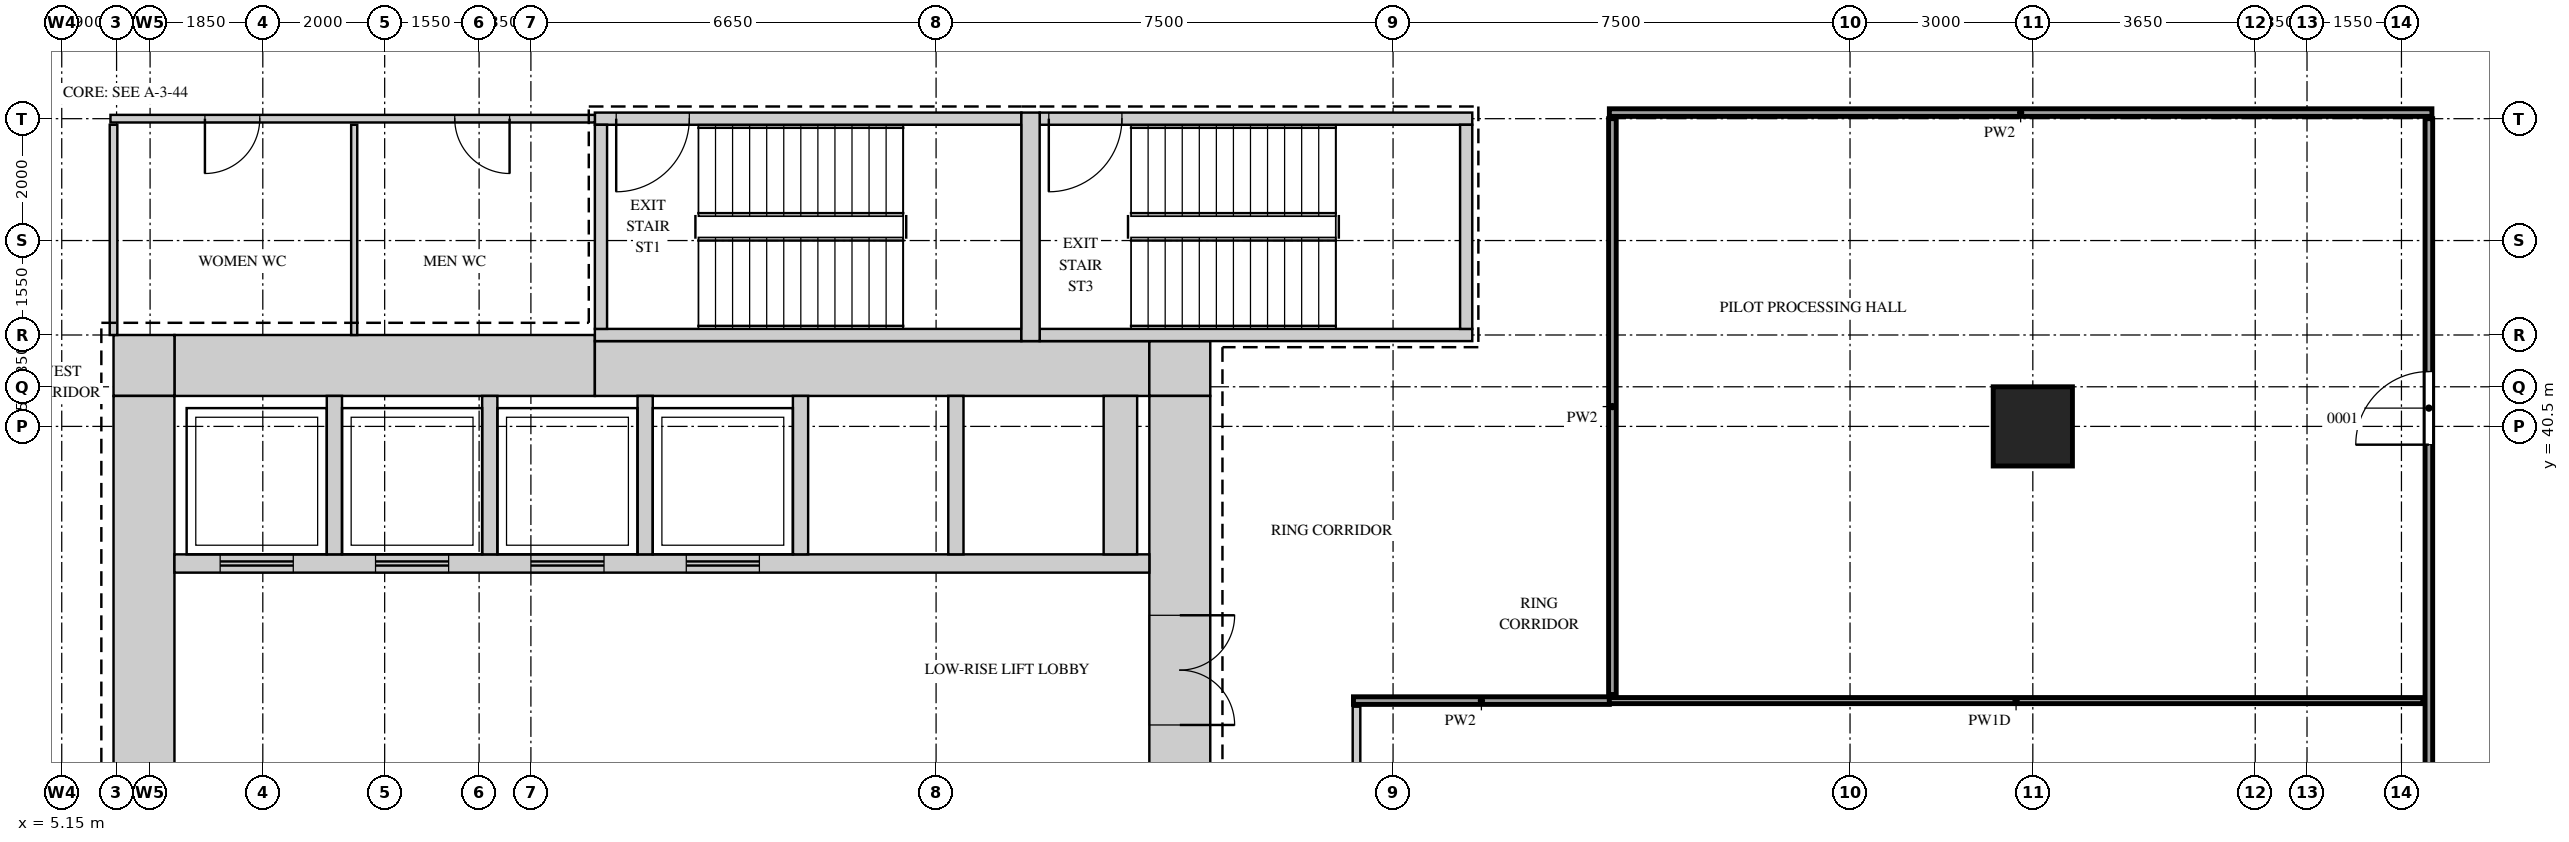
"""IFC4 building model, lengths in metres.
Left out: names, types, materials, properties, quantities, classifications, styles, units other than length and angle.
Written with IfcOpenShell. Run it as: python <this file> out.ifc"""

import sys

from ifc_helpers import new_model, si_unit, direction, frame, frame_2d, origin, origin_2d, place, context, subcontext, project, spatial, rectangle, extrude, source, transform, mapped, element, fill, save


model = new_model("IFC4")
c1 = context("Model", 3, precision=1e-05, world=origin(), true_north=direction((0.0, 1.0)))
c2 = subcontext(c1, "Body", "Model", "MODEL_VIEW")
j1 = project(units=[si_unit("LENGTHUNIT", "METRE"), si_unit("PLANEANGLEUNIT", "RADIAN")], contexts=[c1])
p1 = place(None, origin())
s1 = spatial("IfcSite", under=j1, at=p1, CompositionType="ELEMENT")
p2 = place(p1, origin())
s2 = spatial("IfcBuilding", under=s1, at=p2, CompositionType="ELEMENT")
p3 = place(p2, frame((0.0, 0.0, 123.5)))
s3 = spatial("IfcBuildingStorey", under=s2, at=p3, CompositionType="ELEMENT", Elevation=123.5)
m1 = source(origin(), c2, "Body", "SweptSolid", [
    extrude(rectangle(XDim=6.9, YDim=1.0, at=frame_2d((3.45, 0.0))), origin(), (0.0, 0.0, 1.0), 4.1),
])
p4 = place(p3, frame((7.0, 41.5, 0.0), z_axis=(0.0, 0.0, 1.0), x_axis=(1.0, 0.0, 0.0)))
e1 = element("IfcWall", 1, at=p4, inside=s3, PredefinedType="SHEAR", context=c2, shape_type="MappedRepresentation", body=[
    mapped(m1, transform((0.0, 0.0, 0.0))),
])
m2 = source(origin(), c2, "Body", "SweptSolid", [
    extrude(rectangle(XDim=9.1, YDim=0.9, at=frame_2d((4.55, 0.0))), origin(), (0.0, 0.0, 1.0), 4.1),
])
p5 = place(p3, frame((13.9, 41.45, 0.0), z_axis=(0.0, 0.0, 1.0), x_axis=(1.0, 0.0, 0.0)))
e2 = element("IfcWall", 2, at=p5, inside=s3, PredefinedType="SHEAR", context=c2, shape_type="MappedRepresentation", body=[
    mapped(m2, transform((0.0, 0.0, 0.0))),
])
m3 = source(origin(), c2, "Body", "SweptSolid", [
    extrude(rectangle(XDim=1.0, YDim=0.9, at=frame_2d((0.5, 0.0))), origin(), (0.0, 0.0, 1.0), 4.1),
])
p6 = place(p3, frame((23.0, 41.45, 0.0), z_axis=(0.0, 0.0, 1.0), x_axis=(1.0, 0.0, 0.0)))
e3 = element("IfcWall", 3, at=p6, inside=s3, PredefinedType="SHEAR", context=c2, shape_type="MappedRepresentation", body=[
    mapped(m3, transform((0.0, 0.0, 0.0))),
])
m4 = source(origin(), c2, "Body", "SweptSolid", [
    extrude(rectangle(XDim=1.0, YDim=1.0, at=frame_2d((0.5, 0.0))), origin(), (0.0, 0.0, 1.0), 4.1),
])
p7 = place(p3, frame((6.0, 41.5, 0.0), z_axis=(0.0, 0.0, 1.0), x_axis=(1.0, 0.0, 0.0)))
e4 = element("IfcWall", 4, at=p7, inside=s3, PredefinedType="SHEAR", context=c2, shape_type="MappedRepresentation", body=[
    mapped(m4, transform((0.0, 0.0, 0.0))),
])
m5 = source(origin(), c2, "Body", "SweptSolid", [
    extrude(rectangle(XDim=28.0, YDim=1.0, at=frame_2d((14.0, 0.0))), origin(), (0.0, 0.0, 1.0), 4.1),
])
p8 = place(p3, frame((23.5, 13.0, 0.0), z_axis=(0.0, 0.0, 1.0), x_axis=(0.0, 1.0, 0.0)))
e5 = element("IfcWall", 5, at=p8, inside=s3, PredefinedType="SHEAR", context=c2, shape_type="MappedRepresentation", body=[
    mapped(m5, transform((0.0, 0.0, 0.0))),
])
m6 = source(origin(), c2, "Body", "SweptSolid", [
    extrude(rectangle(XDim=1.8, YDim=2.1, at=frame_2d((0.9, 1.05))), frame((0.0, 0.51, 0.0), z_axis=(0.0, -1.0, 0.0), x_axis=(1.0, 0.0, 0.0)), (0.0, 0.0, 1.0), 1.02),
])
p9 = place(p8, frame((22.6, 0.0, 0.0)))
e6 = element("IfcOpeningElement", 6, at=p9, cuts=e5, PredefinedType="OPENING", context=c2, shape_type="MappedRepresentation", body=[
    mapped(m6, transform((0.0, 0.0, 0.0))),
])
m7 = source(origin(), c2, "Body", "SweptSolid", [
    extrude(rectangle(XDim=1.2, YDim=2.1, at=frame_2d((0.6, 1.05))), frame((0.0, 0.51, 0.0), z_axis=(0.0, -1.0, 0.0), x_axis=(1.0, 0.0, 0.0)), (0.0, 0.0, 1.0), 1.02),
])
p10 = place(p8, frame((13.85, 0.0, 0.0)))
e7 = element("IfcOpeningElement", 7, at=p10, cuts=e5, PredefinedType="OPENING", context=c2, shape_type="MappedRepresentation", body=[
    mapped(m7, transform((0.0, 0.0, 0.0))),
])
m8 = source(origin(), c2, "Body", "SweptSolid", [
    extrude(rectangle(XDim=0.9, YDim=2.1, at=frame_2d((0.45, 1.05))), frame((0.0, 0.51, 0.0), z_axis=(0.0, -1.0, 0.0), x_axis=(1.0, 0.0, 0.0)), (0.0, 0.0, 1.0), 1.02),
])
p11 = place(p8, frame((2.15, 0.0, 0.0)))
e8 = element("IfcOpeningElement", 8, at=p11, cuts=e5, PredefinedType="OPENING", context=c2, shape_type="MappedRepresentation", body=[
    mapped(m8, transform((0.0, 0.0, 0.0))),
])
p12 = place(p8, frame((7.0, 0.0, 0.0)))
e9 = element("IfcOpeningElement", 9, at=p12, cuts=e5, PredefinedType="OPENING", context=c2, shape_type="MappedRepresentation", body=[
    mapped(m8, transform((0.0, 0.0, 0.0))),
])
p13 = place(p3, frame((6.5, 13.0, 0.0), z_axis=(0.0, 0.0, 1.0), x_axis=(0.0, 1.0, 0.0)))
e10 = element("IfcWall", 10, at=p13, inside=s3, PredefinedType="SHEAR", context=c2, shape_type="MappedRepresentation", body=[
    mapped(m5, transform((0.0, 0.0, 0.0))),
])
m9 = source(origin(), c2, "Body", "SweptSolid", [
    extrude(rectangle(XDim=7.0, YDim=0.2, at=frame_2d((3.5, 0.0))), origin(), (0.0, 0.0, 1.0), 4.1),
])
p14 = place(p3, frame((13.9, 45.55, 0.0), z_axis=(0.0, 0.0, 1.0), x_axis=(1.0, 0.0, 0.0)))
e11 = element("IfcWall", 11, at=p14, inside=s3, PredefinedType="SHEAR", context=c2, shape_type="MappedRepresentation", body=[
    mapped(m9, transform((0.0, 0.0, 0.0))),
])
m10 = source(origin(), c2, "Body", "SweptSolid", [
    extrude(rectangle(XDim=1.2, YDim=2.1, at=frame_2d((0.6, 1.05))), frame((0.0, 0.11, 0.0), z_axis=(0.0, -1.0, 0.0), x_axis=(1.0, 0.0, 0.0)), (0.0, 0.0, 1.0), 0.22),
])
p15 = place(p14, frame((0.35, 0.0, 0.0)))
e12 = element("IfcOpeningElement", 12, at=p15, cuts=e11, PredefinedType="OPENING", context=c2, shape_type="MappedRepresentation", body=[
    mapped(m10, transform((0.0, 0.0, 0.0))),
])
p16 = place(p3, frame((13.9, 42.0, 0.0), z_axis=(0.0, 0.0, 1.0), x_axis=(1.0, 0.0, 0.0)))
e13 = element("IfcWall", 13, at=p16, inside=s3, PredefinedType="SHEAR", context=c2, shape_type="MappedRepresentation", body=[
    mapped(m9, transform((0.0, 0.0, 0.0))),
])
m11 = source(origin(), c2, "Body", "SweptSolid", [
    extrude(rectangle(XDim=7.1, YDim=0.2, at=frame_2d((3.55, 0.0))), origin(), (0.0, 0.0, 1.0), 4.1),
])
p17 = place(p3, frame((21.2, 45.55, 0.0), z_axis=(0.0, 0.0, 1.0), x_axis=(1.0, 0.0, 0.0)))
e14 = element("IfcWall", 14, at=p17, inside=s3, PredefinedType="SHEAR", context=c2, shape_type="MappedRepresentation", body=[
    mapped(m11, transform((0.0, 0.0, 0.0))),
])
p18 = place(p17, frame((0.15, 0.0, 0.0)))
e15 = element("IfcOpeningElement", 15, at=p18, cuts=e14, PredefinedType="OPENING", context=c2, shape_type="MappedRepresentation", body=[
    mapped(m10, transform((0.0, 0.0, 0.0))),
])
p19 = place(p3, frame((21.2, 42.0, 0.0), z_axis=(0.0, 0.0, 1.0), x_axis=(1.0, 0.0, 0.0)))
e16 = element("IfcWall", 16, at=p19, inside=s3, PredefinedType="SHEAR", context=c2, shape_type="MappedRepresentation", body=[
    mapped(m11, transform((0.0, 0.0, 0.0))),
])
m12 = source(origin(), c2, "Body", "SweptSolid", [
    extrude(rectangle(XDim=3.75, YDim=0.3, at=frame_2d((1.875, 0.0))), origin(), (0.0, 0.0, 1.0), 4.1),
])
p20 = place(p3, frame((21.05, 41.9, 0.0), z_axis=(0.0, 0.0, 1.0), x_axis=(0.0, 1.0, 0.0)))
e17 = element("IfcWall", 17, at=p20, inside=s3, PredefinedType="SHEAR", context=c2, shape_type="MappedRepresentation", body=[
    mapped(m12, transform((0.0, 0.0, 0.0))),
])
m13 = source(origin(), c2, "Body", "SweptSolid", [
    extrude(rectangle(XDim=3.35, YDim=0.2, at=frame_2d((1.675, 0.0))), origin(), (0.0, 0.0, 1.0), 4.1),
])
for number, where, z_axis, x_axis in (
    (18, (14.0, 42.1, 0.0), (0.0, 0.0, 1.0), (0.0, 1.0, 0.0)),
    (19, (28.2, 42.1, 0.0), (0.0, 0.0, 1.0), (0.0, 1.0, 0.0)),
):
    element("IfcWall", number, at=place(p3, frame(where, z_axis=z_axis, x_axis=x_axis)), inside=s3, PredefinedType="SHEAR", context=c2, shape_type="MappedRepresentation", body=[
        mapped(m13, transform((0.0, 0.0, 0.0))),
    ])
m14 = source(origin(), c2, "Body", "SweptSolid", [
    extrude(rectangle(XDim=16.0, YDim=0.3, at=frame_2d((8.0, 0.0))), origin(), (0.0, 0.0, 1.0), 4.1),
])
p21 = place(p3, frame((7.0, 38.25, 0.0), z_axis=(0.0, 0.0, 1.0), x_axis=(1.0, 0.0, 0.0)))
e20 = element("IfcWall", 20, at=p21, inside=s3, PredefinedType="STANDARD", context=c2, shape_type="MappedRepresentation", body=[
    mapped(m14, transform((0.0, 0.0, 0.0))),
])
m15 = source(origin(), c2, "Body", "SweptSolid", [
    extrude(rectangle(XDim=1.2, YDim=2.1, at=frame_2d((0.6, 1.05))), frame((0.0, 0.16, 0.0), z_axis=(0.0, -1.0, 0.0), x_axis=(1.0, 0.0, 0.0)), (0.0, 0.0, 1.0), 0.32),
])
p22 = place(p21, frame((0.75, 0.0, 0.0)))
e21 = element("IfcOpeningElement", 21, at=p22, cuts=e20, PredefinedType="OPENING", context=c2, shape_type="MappedRepresentation", body=[
    mapped(m15, transform((0.0, 0.0, 0.0))),
])
p23 = place(p21, frame((3.3, 0.0, 0.0)))
e22 = element("IfcOpeningElement", 22, at=p23, cuts=e20, PredefinedType="OPENING", context=c2, shape_type="MappedRepresentation", body=[
    mapped(m15, transform((0.0, 0.0, 0.0))),
])
p24 = place(p21, frame((5.85, 0.0, 0.0)))
e23 = element("IfcOpeningElement", 23, at=p24, cuts=e20, PredefinedType="OPENING", context=c2, shape_type="MappedRepresentation", body=[
    mapped(m15, transform((0.0, 0.0, 0.0))),
])
p25 = place(p21, frame((8.4, 0.0, 0.0)))
e24 = element("IfcOpeningElement", 24, at=p25, cuts=e20, PredefinedType="OPENING", context=c2, shape_type="MappedRepresentation", body=[
    mapped(m15, transform((0.0, 0.0, 0.0))),
])
m16 = source(origin(), c2, "Body", "SweptSolid", [
    extrude(rectangle(XDim=2.6, YDim=0.25, at=frame_2d((1.3, 0.0))), origin(), (0.0, 0.0, 1.0), 4.1),
])
for number, where, z_axis, x_axis in (
    (25, (9.625, 38.4, 0.0), (0.0, 0.0, 1.0), (0.0, 1.0, 0.0)),
    (26, (12.175, 38.4, 0.0), (0.0, 0.0, 1.0), (0.0, 1.0, 0.0)),
    (27, (14.725, 38.4, 0.0), (0.0, 0.0, 1.0), (0.0, 1.0, 0.0)),
    (28, (17.275, 38.4, 0.0), (0.0, 0.0, 1.0), (0.0, 1.0, 0.0)),
    (29, (19.825, 38.4, 0.0), (0.0, 0.0, 1.0), (0.0, 1.0, 0.0)),
):
    element("IfcWall", number, at=place(p3, frame(where, z_axis=z_axis, x_axis=x_axis)), inside=s3, PredefinedType="STANDARD", context=c2, shape_type="MappedRepresentation", body=[
        mapped(m16, transform((0.0, 0.0, 0.0))),
    ])
m17 = source(origin(), c2, "Body", "SweptSolid", [
    extrude(rectangle(XDim=2.6, YDim=0.55, at=frame_2d((1.3, 0.0))), origin(), (0.0, 0.0, 1.0), 4.1),
])
p26 = place(p3, frame((22.525, 38.4, 0.0), z_axis=(0.0, 0.0, 1.0), x_axis=(0.0, 1.0, 0.0)))
e30 = element("IfcWall", 30, at=p26, inside=s3, PredefinedType="STANDARD", context=c2, shape_type="MappedRepresentation", body=[
    mapped(m17, transform((0.0, 0.0, 0.0))),
])
m18 = source(origin(), c2, "Body", "SweptSolid", [
    extrude(rectangle(XDim=1.3, YDim=1.3, at=origin_2d()), origin(), (0.0, 0.0, 1.0), 4.1),
])
p27 = place(p3, frame((37.5, 40.5, 0.0), z_axis=(0.0, 0.0, 1.0), x_axis=(1.0, 0.0, 0.0)))
e31 = element("IfcColumn", 31, at=p27, inside=s3, PredefinedType="COLUMN", context=c2, shape_type="MappedRepresentation", body=[
    mapped(m18, transform((0.0, 0.0, 0.0))),
])
m19 = source(origin(), c2, "Body", "SweptSolid", [
    extrude(rectangle(XDim=23.2, YDim=0.125, at=frame_2d((11.6, 0.0))), origin(), (0.0, 0.0, 1.0), 4.2),
])
p28 = place(p3, frame((26.4, 12.7, 0.0), z_axis=(0.0, 0.0, 1.0), x_axis=(0.0, 1.0, 0.0)))
e32 = element("IfcWall", 32, at=p28, inside=s3, PredefinedType="PARTITIONING", context=c2, shape_type="MappedRepresentation", body=[
    mapped(m19, transform((0.0, 0.0, 0.0))),
])
m20 = source(origin(), c2, "Body", "SweptSolid", [
    extrude(rectangle(XDim=1.2, YDim=2.1, at=frame_2d((0.6, 1.05))), frame((0.0, 0.073, 0.0), z_axis=(0.0, -1.0, 0.0), x_axis=(1.0, 0.0, 0.0)), (0.0, 0.0, 1.0), 0.145),
])
p29 = place(p28, frame((6.65, 0.0, 0.0)))
e33 = element("IfcOpeningElement", 33, at=p29, cuts=e32, PredefinedType="OPENING", context=c2, shape_type="MappedRepresentation", body=[
    mapped(m20, transform((0.0, 0.0, 0.0))),
])
m21 = source(origin(), c2, "Body", "SweptSolid", [
    extrude(rectangle(XDim=32.85, YDim=0.125, at=frame_2d((16.425, 0.0))), origin(), (0.0, 0.0, 1.0), 4.2),
])
p30 = place(p3, frame((44.0, 12.7, 0.0), z_axis=(0.0, 0.0, 1.0), x_axis=(0.0, 1.0, 0.0)))
e34 = element("IfcWall", 34, at=p30, inside=s3, PredefinedType="PARTITIONING", context=c2, shape_type="MappedRepresentation", body=[
    mapped(m21, transform((0.0, 0.0, 0.0))),
])
p31 = place(p30, frame((18.2, 0.0, 0.0)))
e35 = element("IfcOpeningElement", 35, at=p31, cuts=e34, PredefinedType="OPENING", context=c2, shape_type="MappedRepresentation", body=[
    mapped(m20, transform((0.0, 0.0, 0.0))),
])
p32 = place(p30, frame((27.5, 0.0, 0.0)))
e36 = element("IfcOpeningElement", 36, at=p32, cuts=e34, PredefinedType="OPENING", context=c2, shape_type="MappedRepresentation", body=[
    mapped(m20, transform((0.0, 0.0, 0.0))),
])
m22 = source(origin(), c2, "Body", "SweptSolid", [
    extrude(rectangle(XDim=4.2, YDim=0.125, at=frame_2d((2.1, 0.0))), origin(), (0.0, 0.0, 1.0), 4.2),
])
p33 = place(p3, frame((26.35, 36.0, 0.0), z_axis=(0.0, 0.0, 1.0), x_axis=(1.0, 0.0, 0.0)))
e37 = element("IfcWall", 37, at=p33, inside=s3, PredefinedType="PARTITIONING", context=c2, shape_type="MappedRepresentation", body=[
    mapped(m22, transform((0.0, 0.0, 0.0))),
])
m23 = source(origin(), c2, "Body", "SweptSolid", [
    extrude(rectangle(XDim=13.35, YDim=0.1, at=frame_2d((6.675, 0.0))), origin(), (0.0, 0.0, 1.0), 4.2),
])
p34 = place(p3, frame((30.55, 36.0, 0.0), z_axis=(0.0, 0.0, 1.0), x_axis=(1.0, 0.0, 0.0)))
e38 = element("IfcWall", 38, at=p34, inside=s3, PredefinedType="PARTITIONING", context=c2, shape_type="MappedRepresentation", body=[
    mapped(m23, transform((0.0, 0.0, 0.0))),
])
m24 = source(origin(), c2, "Body", "SweptSolid", [
    extrude(rectangle(XDim=9.45, YDim=0.125, at=frame_2d((4.725, 0.0))), origin(), (0.0, 0.0, 1.0), 4.2),
])
p35 = place(p3, frame((30.6, 36.1, 0.0), z_axis=(0.0, 0.0, 1.0), x_axis=(0.0, 1.0, 0.0)))
e39 = element("IfcWall", 39, at=p35, inside=s3, PredefinedType="PARTITIONING", context=c2, shape_type="MappedRepresentation", body=[
    mapped(m24, transform((0.0, 0.0, 0.0))),
])
m25 = source(origin(), c2, "Body", "SweptSolid", [
    extrude(rectangle(XDim=3.45, YDim=0.125, at=frame_2d((1.725, 0.0))), origin(), (0.0, 0.0, 1.0), 4.2),
])
p36 = place(p3, frame((6.0, 42.0, 0.0), z_axis=(0.0, 0.0, 1.0), x_axis=(0.0, 1.0, 0.0)))
e40 = element("IfcWall", 40, at=p36, inside=s3, PredefinedType="PARTITIONING", context=c2, shape_type="MappedRepresentation", body=[
    mapped(m25, transform((0.0, 0.0, 0.0))),
])
m26 = source(origin(), c2, "Body", "SweptSolid", [
    extrude(rectangle(XDim=3.45, YDim=0.1, at=frame_2d((1.725, 0.0))), origin(), (0.0, 0.0, 1.0), 4.2),
])
p37 = place(p3, frame((9.95, 42.0, 0.0), z_axis=(0.0, 0.0, 1.0), x_axis=(0.0, 1.0, 0.0)))
e41 = element("IfcWall", 41, at=p37, inside=s3, PredefinedType="PARTITIONING", context=c2, shape_type="MappedRepresentation", body=[
    mapped(m26, transform((0.0, 0.0, 0.0))),
])
m27 = source(origin(), c2, "Body", "SweptSolid", [
    extrude(rectangle(XDim=7.95, YDim=0.125, at=frame_2d((3.975, 0.0))), origin(), (0.0, 0.0, 1.0), 4.2),
])
p38 = place(p3, frame((5.95, 45.55, 0.0), z_axis=(0.0, 0.0, 1.0), x_axis=(1.0, 0.0, 0.0)))
e42 = element("IfcWall", 42, at=p38, inside=s3, PredefinedType="PARTITIONING", context=c2, shape_type="MappedRepresentation", body=[
    mapped(m27, transform((0.0, 0.0, 0.0))),
])
m28 = source(origin(), c2, "Body", "SweptSolid", [
    extrude(rectangle(XDim=0.9, YDim=2.1, at=frame_2d((0.45, 1.05))), frame((0.0, 0.073, 0.0), z_axis=(0.0, -1.0, 0.0), x_axis=(1.0, 0.0, 0.0)), (0.0, 0.0, 1.0), 0.145),
])
p39 = place(p38, frame((1.55, 0.0, 0.0)))
e43 = element("IfcOpeningElement", 43, at=p39, cuts=e42, PredefinedType="OPENING", context=c2, shape_type="MappedRepresentation", body=[
    mapped(m28, transform((0.0, 0.0, 0.0))),
])
p40 = place(p38, frame((5.65, 0.0, 0.0)))
e44 = element("IfcOpeningElement", 44, at=p40, cuts=e42, PredefinedType="OPENING", context=c2, shape_type="MappedRepresentation", body=[
    mapped(m28, transform((0.0, 0.0, 0.0))),
])
m29 = source(origin(), c2, "Body", "SweptSolid", [
    extrude(rectangle(XDim=13.5, YDim=0.125, at=frame_2d((6.75, 0.0))), origin(), (0.0, 0.0, 1.0), 4.2),
])
p41 = place(p3, frame((30.55, 45.65, 0.0), z_axis=(0.0, 0.0, 1.0), x_axis=(1.0, 0.0, 0.0)))
e45 = element("IfcWall", 45, at=p41, inside=s3, PredefinedType="PARTITIONING", context=c2, shape_type="MappedRepresentation", body=[
    mapped(m29, transform((0.0, 0.0, 0.0))),
])
m30 = source(origin(), c2, "Body", "SweptSolid", [
    extrude(rectangle(XDim=1.8, YDim=2.1, at=frame_2d((0.9, 1.05))), frame((0.0, 0.45, 0.0), z_axis=(0.0, -1.0, 0.0), x_axis=(1.0, 0.0, 0.0)), (0.0, 0.0, 1.0), 0.9),
])
p42 = place(p9, origin())
e46 = element("IfcDoor", 46, at=p42, inside=s3, OperationType="DOUBLE_DOOR_SINGLE_SWING", PredefinedType="DOOR", context=c2, shape_type="MappedRepresentation", body=[
    mapped(m30, transform((0.0, 0.0, 0.0))),
])
fill(e6, e46)
m31 = source(origin(), c2, "Body", "SweptSolid", [
    extrude(rectangle(XDim=1.2, YDim=2.1, at=frame_2d((0.6, 1.05))), frame((0.0, 0.025, 0.0), z_axis=(0.0, -1.0, 0.0), x_axis=(1.0, 0.0, 0.0)), (0.0, 0.0, 1.0), 0.05),
])
p43 = place(p32, origin())
e47 = element("IfcDoor", 47, at=p43, inside=s3, OperationType="SINGLE_SWING_RIGHT", PredefinedType="DOOR", context=c2, shape_type="MappedRepresentation", body=[
    mapped(m31, transform((0.0, 0.0, 0.0))),
])
fill(e36, e47)
m32 = source(origin(), c2, "Body", "SweptSolid", [
    extrude(rectangle(XDim=0.9, YDim=2.1, at=frame_2d((0.45, 1.05))), frame((0.0, 0.025, 0.0), z_axis=(0.0, -1.0, 0.0), x_axis=(1.0, 0.0, 0.0)), (0.0, 0.0, 1.0), 0.05),
])
p44 = place(p39, origin())
e48 = element("IfcDoor", 48, at=p44, inside=s3, OperationType="SINGLE_SWING_LEFT", PredefinedType="DOOR", context=c2, shape_type="MappedRepresentation", body=[
    mapped(m32, transform((0.0, 0.0, 0.0))),
])
fill(e43, e48)
p45 = place(p40, origin())
e49 = element("IfcDoor", 49, at=p45, inside=s3, OperationType="SINGLE_SWING_RIGHT", PredefinedType="DOOR", context=c2, shape_type="MappedRepresentation", body=[
    mapped(m32, transform((0.0, 0.0, 0.0))),
])
fill(e44, e49)
p46 = place(p15, origin())
e50 = element("IfcDoor", 50, at=p46, inside=s3, OperationType="SINGLE_SWING_LEFT", PredefinedType="DOOR", context=c2, shape_type="MappedRepresentation", body=[
    mapped(m31, transform((0.0, 0.0, 0.0))),
])
fill(e12, e50)
p47 = place(p18, origin())
e51 = element("IfcDoor", 51, at=p47, inside=s3, OperationType="SINGLE_SWING_LEFT", PredefinedType="DOOR", context=c2, shape_type="MappedRepresentation", body=[
    mapped(m31, transform((0.0, 0.0, 0.0))),
])
fill(e15, e51)
p48 = place(p22, origin())
e52 = element("IfcDoor", 52, at=p48, inside=s3, OperationType="DOUBLE_DOOR_SLIDING", PredefinedType="DOOR", context=c2, shape_type="MappedRepresentation", body=[
    mapped(m31, transform((0.0, 0.0, 0.0))),
])
fill(e21, e52)
p49 = place(p23, origin())
e53 = element("IfcDoor", 53, at=p49, inside=s3, OperationType="DOUBLE_DOOR_SLIDING", PredefinedType="DOOR", context=c2, shape_type="MappedRepresentation", body=[
    mapped(m31, transform((0.0, 0.0, 0.0))),
])
fill(e22, e53)
p50 = place(p24, origin())
e54 = element("IfcDoor", 54, at=p50, inside=s3, OperationType="DOUBLE_DOOR_SLIDING", PredefinedType="DOOR", context=c2, shape_type="MappedRepresentation", body=[
    mapped(m31, transform((0.0, 0.0, 0.0))),
])
fill(e23, e54)
p51 = place(p25, origin())
e55 = element("IfcDoor", 55, at=p51, inside=s3, OperationType="DOUBLE_DOOR_SLIDING", PredefinedType="DOOR", context=c2, shape_type="MappedRepresentation", body=[
    mapped(m31, transform((0.0, 0.0, 0.0))),
])
fill(e24, e55)
save(model, sys.argv[1])
